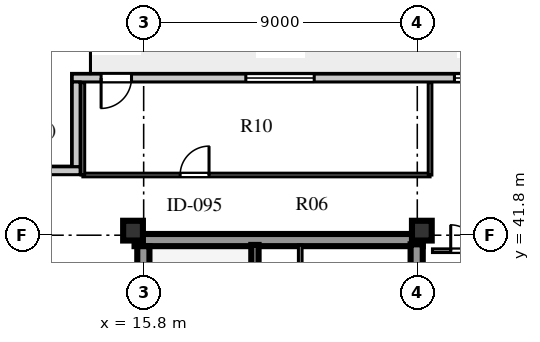
"""IFC4 building model, lengths in metres.
Left out: names, types, materials, properties, quantities, classifications, styles, units other than length and angle.
Written with IfcOpenShell. Run it as: python <this file> out.ifc"""

import sys

from ifc_helpers import new_model, si_unit, direction, frame, frame_2d, origin, origin_2d, place, context, subcontext, project, spatial, rectangle, extrude, element, fill, save


model = new_model("IFC4")
c1 = context("Model", 3, precision=1e-05, world=origin(), true_north=direction((0.0, 1.0)))
c2 = subcontext(c1, "Body", "Model", "MODEL_VIEW")
j1 = project(units=[si_unit("LENGTHUNIT", "METRE"), si_unit("PLANEANGLEUNIT", "RADIAN")], contexts=[c1])
p1 = place(None, origin())
s1 = spatial("IfcSite", under=j1, at=p1, CompositionType="ELEMENT")
p2 = place(p1, origin())
s2 = spatial("IfcBuilding", under=s1, at=p2, CompositionType="ELEMENT")
p3 = place(p2, frame((0.0, 0.0, 288.2)))
s3 = spatial("IfcBuildingStorey", under=s2, at=p3, CompositionType="ELEMENT", Elevation=288.2)
p4 = place(p3, frame((15.5, 41.64, 0.0), z_axis=(0.0, 0.0, 1.0), x_axis=(1.0, 0.0, 0.0)))
e1 = element("IfcWall", 1, at=p4, inside=s3, PredefinedType="SHEAR", context=c2, shape_type="SweptSolid", body=[
    extrude(rectangle(XDim=9.48, YDim=0.4, at=frame_2d((4.74, 0.0))), origin(), (0.0, 0.0, 1.0), 3.66),
])
p5 = place(p3, frame((15.79, 15.81, 0.0), z_axis=(0.0, 0.0, 1.0), x_axis=(0.0, 1.0, 0.0)))
e2 = element("IfcWall", 2, at=p5, inside=s3, PredefinedType="SHEAR", context=c2, shape_type="SweptSolid", body=[
    extrude(rectangle(XDim=25.63, YDim=0.4, at=frame_2d((12.815, 0.0))), origin(), (0.0, 0.0, 1.0), 3.66),
])
p6 = place(p3, frame((24.78, 15.74, 0.0), z_axis=(0.0, 0.0, 1.0), x_axis=(0.0, 1.0, 0.0)))
e3 = element("IfcWall", 3, at=p6, inside=s3, PredefinedType="SHEAR", context=c2, shape_type="SweptSolid", body=[
    extrude(rectangle(XDim=25.76, YDim=0.4, at=frame_2d((12.88, 0.0))), origin(), (0.0, 0.0, 1.0), 3.66),
])
p7 = place(p6, frame((1.61, 0.0, 0.0)))
e4 = element("IfcOpeningElement", 4, at=p7, cuts=e3, PredefinedType="OPENING", context=c2, shape_type="SweptSolid", body=[
    extrude(rectangle(XDim=1.2, YDim=2.1, at=frame_2d((0.6, 1.05))), frame((0.0, 0.21, 0.0), z_axis=(0.0, -1.0, 0.0), x_axis=(1.0, 0.0, 0.0)), (0.0, 0.0, 1.0), 0.42),
])
p8 = place(p6, frame((6.78, 0.0, 0.0)))
e5 = element("IfcOpeningElement", 5, at=p8, cuts=e3, PredefinedType="OPENING", context=c2, shape_type="SweptSolid", body=[
    extrude(rectangle(XDim=0.85, YDim=2.06, at=frame_2d((0.425, 1.03))), frame((0.0, 0.21, 0.0), z_axis=(0.0, -1.0, 0.0), x_axis=(1.0, 0.0, 0.0)), (0.0, 0.0, 1.0), 0.42),
])
p9 = place(p6, frame((12.11, 0.0, 0.0)))
e6 = element("IfcOpeningElement", 6, at=p9, cuts=e3, PredefinedType="OPENING", context=c2, shape_type="SweptSolid", body=[
    extrude(rectangle(XDim=1.5, YDim=2.12, at=frame_2d((0.75, 1.06))), frame((0.0, 0.21, 0.0), z_axis=(0.0, -1.0, 0.0), x_axis=(1.0, 0.0, 0.0)), (0.0, 0.0, 1.0), 0.42),
])
p10 = place(p6, frame((20.11, 0.0, 0.0)))
e7 = element("IfcOpeningElement", 7, at=p10, cuts=e3, PredefinedType="OPENING", context=c2, shape_type="SweptSolid", body=[
    extrude(rectangle(XDim=1.2, YDim=2.12, at=frame_2d((0.6, 1.06))), frame((0.0, 0.21, 0.0), z_axis=(0.0, -1.0, 0.0), x_axis=(1.0, 0.0, 0.0)), (0.0, 0.0, 1.0), 0.42),
])
p11 = place(p6, frame((24.01, 0.0, 0.0)))
e8 = element("IfcOpeningElement", 8, at=p11, cuts=e3, PredefinedType="OPENING", context=c2, shape_type="SweptSolid", body=[
    extrude(rectangle(XDim=0.95, YDim=2.1, at=frame_2d((0.475, 1.05))), frame((0.0, 0.21, 0.0), z_axis=(0.0, -1.0, 0.0), x_axis=(1.0, 0.0, 0.0)), (0.0, 0.0, 1.0), 0.42),
])
for number, where, z_axis, x_axis in (
    (9, (15.45, 41.95, 0.0), (0.0, 0.0, 1.0), (1.0, 0.0, 0.0)),
    (10, (24.95, 41.95, 0.0), (0.0, 0.0, 1.0), (1.0, 0.0, 0.0)),
):
    element("IfcColumn", number, at=place(p3, frame(where, z_axis=z_axis, x_axis=x_axis)), inside=s3, PredefinedType="COLUMN", context=c2, shape_type="SweptSolid", body=[
        extrude(rectangle(XDim=0.65, YDim=0.65, at=origin_2d()), origin(), (0.0, 0.0, 1.0), 3.66),
    ])
p12 = place(p3, frame((45.15, 46.97, 0.0), z_axis=(0.0, 0.0, 1.0), x_axis=(-1.0, 0.0, 0.0)))
e11 = element("IfcWall", 11, at=p12, inside=s3, PredefinedType="SOLIDWALL", context=c2, shape_type="SweptSolid", body=[
    extrude(rectangle(XDim=31.7, YDim=0.26, at=frame_2d((15.85, 0.0))), origin(), (0.0, 0.0, 1.0), 3.66),
])
p13 = place(p12, frame((29.75, 0.0, 0.0)))
e12 = element("IfcOpeningElement", 12, at=p13, cuts=e11, PredefinedType="OPENING", context=c2, shape_type="SweptSolid", body=[
    extrude(rectangle(XDim=1.0, YDim=2.05, at=frame_2d((0.5, 1.025))), frame((0.0, 0.14, 0.0), z_axis=(0.0, -1.0, 0.0), x_axis=(1.0, 0.0, 0.0)), (0.0, 0.0, 1.0), 0.28),
])
p14 = place(p12, frame((23.74, 0.0, 0.8)))
e13 = element("IfcOpeningElement", 13, at=p14, cuts=e11, PredefinedType="OPENING", context=c2, shape_type="SweptSolid", body=[
    extrude(rectangle(XDim=2.25, YDim=2.0, at=frame_2d((1.125, 1.0))), frame((0.0, 0.14, 0.0), z_axis=(0.0, -1.0, 0.0), x_axis=(1.0, 0.0, 0.0)), (0.0, 0.0, 1.0), 0.28),
])
p15 = place(p12, frame((17.328, 0.0, 0.8)))
e14 = element("IfcOpeningElement", 14, at=p15, cuts=e11, PredefinedType="OPENING", context=c2, shape_type="SweptSolid", body=[
    extrude(rectangle(XDim=1.8, YDim=2.0, at=frame_2d((0.9, 1.0))), frame((0.0, 0.14, 0.0), z_axis=(0.0, -1.0, 0.0), x_axis=(1.0, 0.0, 0.0)), (0.0, 0.0, 1.0), 0.28),
])
p16 = place(p12, frame((12.728, 0.0, 0.8)))
e15 = element("IfcOpeningElement", 15, at=p16, cuts=e11, PredefinedType="OPENING", context=c2, shape_type="SweptSolid", body=[
    extrude(rectangle(XDim=1.5, YDim=2.0, at=frame_2d((0.75, 1.0))), frame((0.0, 0.14, 0.0), z_axis=(0.0, -1.0, 0.0), x_axis=(1.0, 0.0, 0.0)), (0.0, 0.0, 1.0), 0.28),
])
p17 = place(p12, frame((4.67, 0.0, 0.8)))
e16 = element("IfcOpeningElement", 16, at=p17, cuts=e11, PredefinedType="OPENING", context=c2, shape_type="SweptSolid", body=[
    extrude(rectangle(XDim=1.2, YDim=1.75, at=frame_2d((0.6, 0.875))), frame((0.0, 0.14, 0.0), z_axis=(0.0, -1.0, 0.0), x_axis=(1.0, 0.0, 0.0)), (0.0, 0.0, 1.0), 0.28),
])
p18 = place(p3, frame((13.58, 46.84, 0.0), z_axis=(0.0, 0.0, 1.0), x_axis=(0.0, -1.0, 0.0)))
e17 = element("IfcWall", 17, at=p18, inside=s3, PredefinedType="SOLIDWALL", context=c2, shape_type="SweptSolid", body=[
    extrude(rectangle(XDim=2.79, YDim=0.26, at=frame_2d((1.395, 0.0))), origin(), (0.0, 0.0, 1.0), 3.66),
])
p19 = place(p3, frame((13.71, 43.92, 0.0), z_axis=(0.0, 0.0, 1.0), x_axis=(-1.0, 0.0, 0.0)))
e18 = element("IfcWall", 18, at=p19, inside=s3, PredefinedType="SOLIDWALL", context=c2, shape_type="SweptSolid", body=[
    extrude(rectangle(XDim=3.31, YDim=0.26, at=frame_2d((1.655, 0.0))), origin(), (0.0, 0.0, 1.0), 3.66),
])
p20 = place(p3, frame((19.46, 33.3, 0.0), z_axis=(0.0, 0.0, 1.0), x_axis=(0.0, 1.0, 0.0)))
e19 = element("IfcWall", 19, at=p20, inside=s3, PredefinedType="SHEAR", context=c2, shape_type="SweptSolid", body=[
    extrude(rectangle(XDim=8.18, YDim=0.24, at=frame_2d((4.09, 0.0))), origin(), (0.0, 0.0, 1.0), 3.9),
])
p21 = place(p20, frame((0.65, 0.0, 0.0)))
e20 = element("IfcOpeningElement", 20, at=p21, cuts=e19, PredefinedType="OPENING", context=c2, shape_type="SweptSolid", body=[
    extrude(rectangle(XDim=1.1, YDim=2.1, at=frame_2d((0.55, 1.05))), frame((0.0, 0.13, 0.0), z_axis=(0.0, -1.0, 0.0), x_axis=(1.0, 0.0, 0.0)), (0.0, 0.0, 1.0), 0.26),
])
p22 = place(p3, frame((20.95, 39.4, 0.0), z_axis=(0.0, 0.0, 1.0), x_axis=(0.0, 1.0, 0.0)))
e21 = element("IfcWall", 21, at=p22, inside=s3, PredefinedType="PARTITIONING", context=c2, shape_type="SweptSolid", body=[
    extrude(rectangle(XDim=2.08, YDim=0.12, at=frame_2d((1.04, 0.0))), origin(), (0.0, 0.0, 1.0), 3.66),
])
p23 = place(p22, frame((0.55, 0.0, 0.0)))
e22 = element("IfcOpeningElement", 22, at=p23, cuts=e21, PredefinedType="OPENING", context=c2, shape_type="SweptSolid", body=[
    extrude(rectangle(XDim=0.85, YDim=2.06, at=frame_2d((0.425, 1.03))), frame((0.0, 0.07, 0.0), z_axis=(0.0, -1.0, 0.0), x_axis=(1.0, 0.0, 0.0)), (0.0, 0.0, 1.0), 0.14),
])
p24 = place(p3, frame((13.8, 43.78, 0.0), z_axis=(0.0, 0.0, 1.0), x_axis=(1.0, 0.0, 0.0)))
e23 = element("IfcWall", 23, at=p24, inside=s3, PredefinedType="PARTITIONING", context=c2, shape_type="SweptSolid", body=[
    extrude(rectangle(XDim=11.42, YDim=0.12, at=frame_2d((5.71, 0.0))), origin(), (0.0, 0.0, 1.0), 3.66),
])
p25 = place(p24, frame((3.2, 0.0, 0.0)))
e24 = element("IfcOpeningElement", 24, at=p25, cuts=e23, PredefinedType="OPENING", context=c2, shape_type="SweptSolid", body=[
    extrude(rectangle(XDim=0.95, YDim=2.08, at=frame_2d((0.475, 1.04))), frame((0.0, 0.07, 0.0), z_axis=(0.0, -1.0, 0.0), x_axis=(1.0, 0.0, 0.0)), (0.0, 0.0, 1.0), 0.14),
])
p26 = place(p3, frame((13.8, 43.78, 0.0), z_axis=(0.0, 0.0, 1.0), x_axis=(0.0, 1.0, 0.0)))
e25 = element("IfcWall", 25, at=p26, inside=s3, PredefinedType="PARTITIONING", context=c2, shape_type="SweptSolid", body=[
    extrude(rectangle(XDim=3.04, YDim=0.12, at=frame_2d((1.52, 0.0))), origin(), (0.0, 0.0, 1.0), 3.66),
])
p27 = place(p3, frame((25.22, 43.78, 0.0), z_axis=(0.0, 0.0, 1.0), x_axis=(0.0, 1.0, 0.0)))
e26 = element("IfcWall", 26, at=p27, inside=s3, PredefinedType="PARTITIONING", context=c2, shape_type="SweptSolid", body=[
    extrude(rectangle(XDim=3.04, YDim=0.12, at=frame_2d((1.52, 0.0))), origin(), (0.0, 0.0, 1.0), 3.21),
])
p28 = place(p3, frame((25.3, 41.29, 0.0), z_axis=(0.0, 0.0, 1.0), x_axis=(1.0, 0.0, 0.0)))
e27 = element("IfcWall", 27, at=p28, inside=s3, PredefinedType="PARTITIONING", context=c2, shape_type="SweptSolid", body=[
    extrude(rectangle(XDim=9.34, YDim=0.12, at=frame_2d((4.67, 0.0))), origin(), (0.0, 0.0, 1.0), 3.66),
])
p29 = place(p28, frame((0.6, 0.0, 0.0)))
e28 = element("IfcOpeningElement", 28, at=p29, cuts=e27, PredefinedType="OPENING", context=c2, shape_type="SweptSolid", body=[
    extrude(rectangle(XDim=0.85, YDim=2.08, at=frame_2d((0.425, 1.04))), frame((0.0, 0.07, 0.0), z_axis=(0.0, -1.0, 0.0), x_axis=(1.0, 0.0, 0.0)), (0.0, 0.0, 1.0), 0.14),
])
p30 = place(p28, frame((3.573, 0.0, 0.0)))
e29 = element("IfcOpeningElement", 29, at=p30, cuts=e27, PredefinedType="OPENING", context=c2, shape_type="SweptSolid", body=[
    extrude(rectangle(XDim=0.85, YDim=2.08, at=frame_2d((0.425, 1.04))), frame((0.0, 0.07, 0.0), z_axis=(0.0, -1.0, 0.0), x_axis=(1.0, 0.0, 0.0)), (0.0, 0.0, 1.0), 0.14),
])
p31 = place(p13, frame((1.0, 0.0, 0.0), z_axis=(0.0, 0.0, 1.0), x_axis=(-1.0, 0.0, 0.0)))
e30 = element("IfcDoor", 30, at=p31, inside=s3, OperationType="SINGLE_SWING_LEFT", PredefinedType="DOOR", context=c2, shape_type="SweptSolid", body=[
    extrude(rectangle(XDim=1.0, YDim=2.05, at=frame_2d((0.5, 1.025))), frame((0.0, 0.025, 0.0), z_axis=(0.0, -1.0, 0.0), x_axis=(1.0, 0.0, 0.0)), (0.0, 0.0, 1.0), 0.05),
])
fill(e12, e30)
p32 = place(p14, origin())
e31 = element("IfcWindow", 31, at=p32, inside=s3, PartitioningType="SINGLE_PANEL", PredefinedType="WINDOW", context=c2, shape_type="SweptSolid", body=[
    extrude(rectangle(XDim=2.25, YDim=2.0, at=frame_2d((1.125, 1.0))), frame((0.0, 0.03, 0.0), z_axis=(0.0, -1.0, 0.0), x_axis=(1.0, 0.0, 0.0)), (0.0, 0.0, 1.0), 0.06),
])
fill(e13, e31)
p33 = place(p15, origin())
e32 = element("IfcWindow", 32, at=p33, inside=s3, PartitioningType="SINGLE_PANEL", PredefinedType="WINDOW", context=c2, shape_type="SweptSolid", body=[
    extrude(rectangle(XDim=1.8, YDim=2.0, at=frame_2d((0.9, 1.0))), frame((0.0, 0.03, 0.0), z_axis=(0.0, -1.0, 0.0), x_axis=(1.0, 0.0, 0.0)), (0.0, 0.0, 1.0), 0.06),
])
fill(e14, e32)
p34 = place(p25, origin())
e33 = element("IfcDoor", 33, at=p34, inside=s3, OperationType="SINGLE_SWING_RIGHT", PredefinedType="DOOR", context=c2, shape_type="SweptSolid", body=[
    extrude(rectangle(XDim=0.95, YDim=2.08, at=frame_2d((0.475, 1.04))), frame((0.0, 0.025, 0.0), z_axis=(0.0, -1.0, 0.0), x_axis=(1.0, 0.0, 0.0)), (0.0, 0.0, 1.0), 0.05),
])
fill(e24, e33)
p35 = place(p29, origin())
e34 = element("IfcDoor", 34, at=p35, inside=s3, OperationType="SINGLE_SWING_LEFT", PredefinedType="DOOR", context=c2, shape_type="SweptSolid", body=[
    extrude(rectangle(XDim=0.85, YDim=2.08, at=frame_2d((0.425, 1.04))), frame((0.0, 0.025, 0.0), z_axis=(0.0, -1.0, 0.0), x_axis=(1.0, 0.0, 0.0)), (0.0, 0.0, 1.0), 0.05),
])
fill(e28, e34)
save(model, sys.argv[1])
